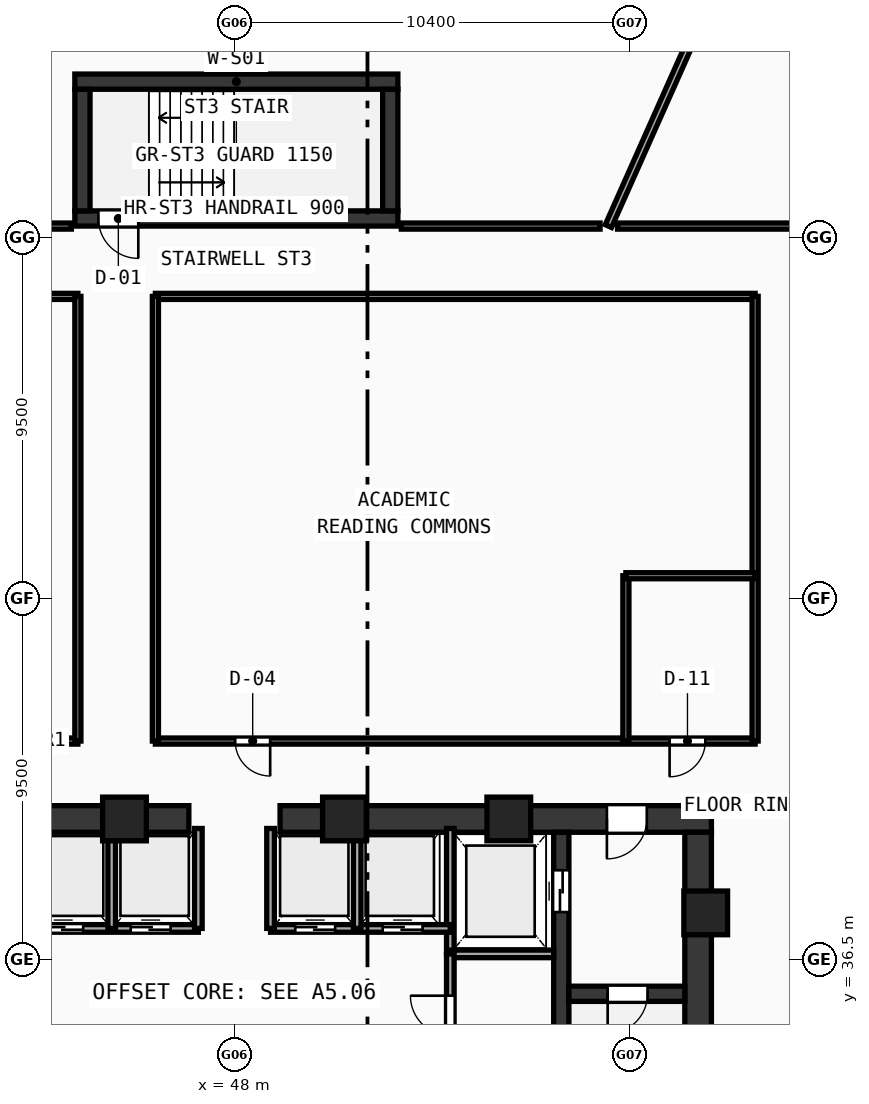
"""IFC4 building model, lengths in metres.
Left out: names, types, materials, properties, quantities, classifications, styles, units other than length and angle.
Written with IfcOpenShell. Run it as: python <this file> out.ifc"""

import sys

from ifc_helpers import new_model, si_unit, direction, frame, frame_2d, origin, origin_with_axes, origin_2d, place, context, subcontext, project, spatial, rectangle, hollow_rectangle, extrude, source, transform, mapped, element, fill, save


model = new_model("IFC4")
c1 = context("Model", 3, precision=1e-05, world=origin(), true_north=direction((0.0, 1.0)))
c2 = subcontext(c1, "Body", "Model", "MODEL_VIEW")
j1 = project(units=[si_unit("LENGTHUNIT", "METRE"), si_unit("PLANEANGLEUNIT", "RADIAN")], contexts=[c1])
p1 = place(None, origin())
s1 = spatial("IfcSite", under=j1, at=p1, CompositionType="ELEMENT")
p2 = place(p1, origin())
s2 = spatial("IfcBuilding", under=s1, at=p2, CompositionType="ELEMENT")
p3 = place(p2, frame((0.0, 0.0, 70.33)))
s3 = spatial("IfcBuildingStorey", under=s2, at=p3, CompositionType="ELEMENT", Elevation=70.33)
p4 = place(p3, frame((35.45, 40.2, 0.0), z_axis=(0.0, 0.0, 1.0), x_axis=(1.0, 0.0, 0.0)))
e1 = element("IfcWall", 1, at=p4, inside=s3, PredefinedType="SHEAR", context=c2, shape_type="SweptSolid", body=[
    extrude(rectangle(XDim=11.35, YDim=0.7, at=frame_2d((5.675, 0.0))), origin(), (0.0, 0.0, 1.0), 5.77),
])
p5 = place(p4, frame((1.7, 0.0, 0.0)))
e2 = element("IfcOpeningElement", 2, at=p5, cuts=e1, PredefinedType="OPENING", context=c2, shape_type="SweptSolid", body=[
    extrude(rectangle(XDim=1.05, YDim=2.1, at=frame_2d((0.525, 1.05))), frame((0.0, 0.36, 0.0), z_axis=(0.0, -1.0, 0.0), x_axis=(1.0, 0.0, 0.0)), (0.0, 0.0, 1.0), 0.72),
])
p6 = place(p3, frame((49.2, 40.2, 0.0), z_axis=(0.0, 0.0, 1.0), x_axis=(1.0, 0.0, 0.0)))
e3 = element("IfcWall", 3, at=p6, inside=s3, PredefinedType="SHEAR", context=c2, shape_type="SweptSolid", body=[
    extrude(rectangle(XDim=11.35, YDim=0.7, at=frame_2d((5.675, 0.0))), origin(), (0.0, 0.0, 1.0), 5.77),
])
p7 = place(p6, frame((8.6, 0.0, 0.0)))
e4 = element("IfcOpeningElement", 4, at=p7, cuts=e3, PredefinedType="OPENING", context=c2, shape_type="SweptSolid", body=[
    extrude(rectangle(XDim=1.05, YDim=2.1, at=frame_2d((0.525, 1.05))), frame((0.0, 0.36, 0.0), z_axis=(0.0, -1.0, 0.0), x_axis=(1.0, 0.0, 0.0)), (0.0, 0.0, 1.0), 0.72),
])
p8 = place(p3, frame((60.2, 27.85, 0.0), z_axis=(0.0, 0.0, 1.0), x_axis=(0.0, 1.0, 0.0)))
e5 = element("IfcWall", 5, at=p8, inside=s3, PredefinedType="SHEAR", context=c2, shape_type="SweptSolid", body=[
    extrude(rectangle(XDim=12.0, YDim=0.7, at=frame_2d((6.0, 0.0))), origin(), (0.0, 0.0, 1.0), 5.77),
])
p9 = place(p3, frame((56.6, 27.85, 0.0), z_axis=(0.0, 0.0, 1.0), x_axis=(0.0, 1.0, 0.0)))
e6 = element("IfcWall", 6, at=p9, inside=s3, PredefinedType="SHEAR", context=c2, shape_type="SweptSolid", body=[
    extrude(rectangle(XDim=12.0, YDim=0.4, at=frame_2d((6.0, 0.0))), origin(), (0.0, 0.0, 1.0), 5.77),
])
p10 = place(p9, frame((9.9, 0.0, 0.0)))
e7 = element("IfcOpeningElement", 7, at=p10, cuts=e6, PredefinedType="OPENING", context=c2, shape_type="SweptSolid", body=[
    extrude(rectangle(XDim=1.1, YDim=2.1, at=frame_2d((0.55, 1.05))), frame((0.0, 0.21, 0.0), z_axis=(0.0, -1.0, 0.0), x_axis=(1.0, 0.0, 0.0)), (0.0, 0.0, 1.0), 0.42),
])
p11 = place(p3, frame((56.8, 35.6, 0.0), z_axis=(0.0, 0.0, 1.0), x_axis=(1.0, 0.0, 0.0)))
e8 = element("IfcWall", 8, at=p11, inside=s3, PredefinedType="SHEAR", context=c2, shape_type="SweptSolid", body=[
    extrude(rectangle(XDim=3.05, YDim=0.4, at=frame_2d((1.525, 0.0))), origin(), (0.0, 0.0, 1.0), 5.77),
])
p12 = place(p11, frame((1.02, 0.0, 0.0)))
e9 = element("IfcOpeningElement", 9, at=p12, cuts=e8, PredefinedType="OPENING", context=c2, shape_type="SweptSolid", body=[
    extrude(rectangle(XDim=1.05, YDim=2.1, at=frame_2d((0.525, 1.05))), frame((0.0, 0.21, 0.0), z_axis=(0.0, -1.0, 0.0), x_axis=(1.0, 0.0, 0.0)), (0.0, 0.0, 1.0), 0.42),
])
p13 = place(p3, frame((43.8, 59.6, 0.0), z_axis=(0.0, 0.0, 1.0), x_axis=(1.0, 0.0, 0.0)))
e10 = element("IfcWall", 10, at=p13, inside=s3, PredefinedType="SHEAR", context=c2, shape_type="SweptSolid", body=[
    extrude(rectangle(XDim=8.5, YDim=0.4, at=frame_2d((4.25, 0.0))), origin(), (0.0, 0.0, 1.0), 5.77),
])
p14 = place(p3, frame((43.8, 56.0, 0.0), z_axis=(0.0, 0.0, 1.0), x_axis=(1.0, 0.0, 0.0)))
e11 = element("IfcWall", 11, at=p14, inside=s3, PredefinedType="SHEAR", context=c2, shape_type="SweptSolid", body=[
    extrude(rectangle(XDim=8.5, YDim=0.4, at=frame_2d((4.25, 0.0))), origin(), (0.0, 0.0, 1.0), 5.77),
])
p15 = place(p14, frame((0.62, 0.0, 0.0)))
e12 = element("IfcOpeningElement", 12, at=p15, cuts=e11, PredefinedType="OPENING", context=c2, shape_type="SweptSolid", body=[
    extrude(rectangle(XDim=1.05, YDim=2.1, at=frame_2d((0.525, 1.05))), frame((0.0, 0.21, 0.0), z_axis=(0.0, -1.0, 0.0), x_axis=(1.0, 0.0, 0.0)), (0.0, 0.0, 1.0), 0.42),
])
for number, where, z_axis, x_axis in (
    (13, (44.0, 56.2, 0.0), (0.0, 0.0, 1.0), (0.0, 1.0, 0.0)),
    (14, (52.1, 56.2, 0.0), (0.0, 0.0, 1.0), (0.0, 1.0, 0.0)),
):
    element("IfcWall", number, at=place(p3, frame(where, z_axis=z_axis, x_axis=x_axis)), inside=s3, PredefinedType="SHEAR", context=c2, shape_type="SweptSolid", body=[
        extrude(rectangle(XDim=3.2, YDim=0.4, at=frame_2d((1.6, 0.0))), origin(), (0.0, 0.0, 1.0), 5.77),
    ])
m1 = source(origin(), c2, "Body", "SweptSolid", [
    extrude(hollow_rectangle(XDim=1.15, YDim=1.15, WallThickness=0.048, at=origin_2d()), origin(), (0.0, 0.0, 1.0), 6.03),
])
for number, where, z_axis, x_axis in (
    (15, (60.4, 37.729, -0.26), (0.0, 0.0, 1.0), (1.0, 0.0, 0.0)),
    (16, (55.219, 40.2, -0.26), (0.0, 0.0, 1.0), (1.0, 0.0, 0.0)),
    (17, (50.894, 40.2, -0.26), (0.0, 0.0, 1.0), (1.0, 0.0, 0.0)),
    (18, (45.106, 40.2, -0.26), (0.0, 0.0, 1.0), (1.0, 0.0, 0.0)),
):
    element("IfcColumn", number, at=place(p3, frame(where, z_axis=z_axis, x_axis=x_axis)), inside=s3, PredefinedType="COLUMN", context=c2, shape_type="MappedRepresentation", body=[
        mapped(m1, transform((0.0, 0.0, 0.0), scale=1.0)),
    ])
p16 = place(p3, frame((53.68, 36.65, 0.0), z_axis=(0.0, 0.0, 1.0), x_axis=(0.0, 1.0, 0.0)))
e19 = element("IfcWall", 19, at=p16, inside=s3, PredefinedType="SOLIDWALL", context=c2, shape_type="SweptSolid", body=[
    extrude(rectangle(XDim=3.3, YDim=0.2, at=frame_2d((1.65, 0.0))), origin(), (0.0, 0.0, 1.0), 5.77),
])
p17 = place(p3, frame((53.68, 36.65, 0.0), z_axis=(0.0, 0.0, 1.0), x_axis=(1.0, 0.0, 0.0)))
e20 = element("IfcWall", 20, at=p17, inside=s3, PredefinedType="SOLIDWALL", context=c2, shape_type="SweptSolid", body=[
    extrude(rectangle(XDim=2.72, YDim=0.2, at=frame_2d((1.36, 0.0))), origin(), (0.0, 0.0, 1.0), 5.77),
])
p18 = place(p3, frame((42.32, 37.32, 0.0), z_axis=(0.0, 0.0, 1.0), x_axis=(1.0, 0.0, 0.0)))
e21 = element("IfcWall", 21, at=p18, inside=s3, PredefinedType="SOLIDWALL", context=c2, shape_type="SweptSolid", body=[
    extrude(rectangle(XDim=4.73, YDim=0.2, at=frame_2d((2.365, 0.0))), origin(), (0.0, 0.0, 1.0), 5.77),
])
p19 = place(p18, frame((0.65, 0.0, 0.0)))
e22 = element("IfcOpeningElement", 22, at=p19, cuts=e21, PredefinedType="OPENING", context=c2, shape_type="SweptSolid", body=[
    extrude(rectangle(XDim=1.05, YDim=2.1, at=frame_2d((0.525, 1.05))), frame((0.0, 0.11, 0.0), z_axis=(0.0, -1.0, 0.0), x_axis=(1.0, 0.0, 0.0)), (0.0, 0.0, 1.0), 0.22),
])
p20 = place(p18, frame((2.95, 0.0, 0.0)))
e23 = element("IfcOpeningElement", 23, at=p20, cuts=e21, PredefinedType="OPENING", context=c2, shape_type="SweptSolid", body=[
    extrude(rectangle(XDim=1.05, YDim=2.1, at=frame_2d((0.525, 1.05))), frame((0.0, 0.11, 0.0), z_axis=(0.0, -1.0, 0.0), x_axis=(1.0, 0.0, 0.0)), (0.0, 0.0, 1.0), 0.22),
])
p21 = place(p3, frame((48.95, 37.32, 0.0), z_axis=(0.0, 0.0, 1.0), x_axis=(1.0, 0.0, 0.0)))
e24 = element("IfcWall", 24, at=p21, inside=s3, PredefinedType="SOLIDWALL", context=c2, shape_type="SweptSolid", body=[
    extrude(rectangle(XDim=4.73, YDim=0.2, at=frame_2d((2.365, 0.0))), origin(), (0.0, 0.0, 1.0), 5.77),
])
p22 = place(p21, frame((0.65, 0.0, 0.0)))
e25 = element("IfcOpeningElement", 25, at=p22, cuts=e24, PredefinedType="OPENING", context=c2, shape_type="SweptSolid", body=[
    extrude(rectangle(XDim=1.05, YDim=2.1, at=frame_2d((0.525, 1.05))), frame((0.0, 0.11, 0.0), z_axis=(0.0, -1.0, 0.0), x_axis=(1.0, 0.0, 0.0)), (0.0, 0.0, 1.0), 0.22),
])
p23 = place(p21, frame((2.95, 0.0, 0.0)))
e26 = element("IfcOpeningElement", 26, at=p23, cuts=e24, PredefinedType="OPENING", context=c2, shape_type="SweptSolid", body=[
    extrude(rectangle(XDim=1.05, YDim=2.1, at=frame_2d((0.525, 1.05))), frame((0.0, 0.11, 0.0), z_axis=(0.0, -1.0, 0.0), x_axis=(1.0, 0.0, 0.0)), (0.0, 0.0, 1.0), 0.22),
])
for number, where, z_axis, x_axis in (
    (27, (47.05, 37.32, 0.0), (0.0, 0.0, 1.0), (0.0, 1.0, 0.0)),
    (28, (48.95, 37.32, 0.0), (0.0, 0.0, 1.0), (0.0, 1.0, 0.0)),
):
    element("IfcWall", number, at=place(p3, frame(where, z_axis=z_axis, x_axis=x_axis)), inside=s3, PredefinedType="SOLIDWALL", context=c2, shape_type="SweptSolid", body=[
        extrude(rectangle(XDim=2.63, YDim=0.2, at=frame_2d((1.315, 0.0))), origin(), (0.0, 0.0, 1.0), 5.77),
    ])
for number, where, z_axis, x_axis in (
    (29, (44.77, 37.32, 0.0), (0.0, 0.0, 1.0), (0.0, 1.0, 0.0)),
    (30, (51.23, 37.32, 0.0), (0.0, 0.0, 1.0), (0.0, 1.0, 0.0)),
):
    element("IfcWall", number, at=place(p3, frame(where, z_axis=z_axis, x_axis=x_axis)), inside=s3, PredefinedType="SOLIDWALL", context=c2, shape_type="SweptSolid", body=[
        extrude(rectangle(XDim=2.63, YDim=0.2, at=frame_2d((1.315, 0.0))), origin(), (0.0, 0.0, 1.0), 2.42),
    ])
p24 = place(p3, frame((53.68, 27.6, 0.0), z_axis=(0.0, 0.0, 1.0), x_axis=(0.0, 1.0, 0.0)))
e31 = element("IfcWall", 31, at=p24, inside=s3, PredefinedType="SOLIDWALL", context=c2, shape_type="SweptSolid", body=[
    extrude(rectangle(XDim=9.05, YDim=0.2, at=frame_2d((4.525, 0.0))), origin(), (0.0, 0.0, 1.0), 2.42),
])
p25 = place(p24, frame((6.9, 0.0, 0.0)))
e32 = element("IfcOpeningElement", 32, at=p25, cuts=e31, PredefinedType="OPENING", context=c2, shape_type="SweptSolid", body=[
    extrude(rectangle(XDim=1.05, YDim=2.1, at=frame_2d((0.525, 1.05))), frame((0.0, 0.11, 0.0), z_axis=(0.0, -1.0, 0.0), x_axis=(1.0, 0.0, 0.0)), (0.0, 0.0, 1.0), 0.22),
])
p26 = place(p3, frame((34.95, 42.25, 0.0), z_axis=(0.0, 0.0, 1.0), x_axis=(1.0, 0.0, 0.0)))
e33 = element("IfcWall", 33, at=p26, inside=s3, PredefinedType="PARTITIONING", context=c2, shape_type="SweptSolid", body=[
    extrude(rectangle(XDim=8.93, YDim=0.16, at=frame_2d((4.465, 0.0))), origin(), (0.0, 0.0, 1.0), 2.42),
])
p27 = place(p26, frame((1.15, 0.0, 0.0)))
e34 = element("IfcOpeningElement", 34, at=p27, cuts=e33, PredefinedType="OPENING", context=c2, shape_type="SweptSolid", body=[
    extrude(rectangle(XDim=0.92, YDim=2.1, at=frame_2d((0.46, 1.05))), frame((0.0, 0.09, 0.0), z_axis=(0.0, -1.0, 0.0), x_axis=(1.0, 0.0, 0.0)), (0.0, 0.0, 1.0), 0.18),
])
p28 = place(p26, frame((4.65, 0.0, 0.0)))
e35 = element("IfcOpeningElement", 35, at=p28, cuts=e33, PredefinedType="OPENING", context=c2, shape_type="SweptSolid", body=[
    extrude(rectangle(XDim=0.92, YDim=2.1, at=frame_2d((0.46, 1.05))), frame((0.0, 0.09, 0.0), z_axis=(0.0, -1.0, 0.0), x_axis=(1.0, 0.0, 0.0)), (0.0, 0.0, 1.0), 0.18),
])
p29 = place(p3, frame((34.95, 53.95, 0.0), z_axis=(0.0, 0.0, 1.0), x_axis=(1.0, 0.0, 0.0)))
e36 = element("IfcWall", 36, at=p29, inside=s3, PredefinedType="PARTITIONING", context=c2, shape_type="SweptSolid", body=[
    extrude(rectangle(XDim=8.93, YDim=0.16, at=frame_2d((4.465, 0.0))), origin(), (0.0, 0.0, 1.0), 2.42),
])
p30 = place(p3, frame((43.88, 42.25, 0.0), z_axis=(0.0, 0.0, 1.0), x_axis=(0.0, 1.0, 0.0)))
e37 = element("IfcWall", 37, at=p30, inside=s3, PredefinedType="PARTITIONING", context=c2, shape_type="SweptSolid", body=[
    extrude(rectangle(XDim=11.7, YDim=0.16, at=frame_2d((5.85, 0.0))), origin(), (0.0, 0.0, 1.0), 2.42),
])
p31 = place(p3, frame((45.92, 42.25, 0.0), z_axis=(0.0, 0.0, 1.0), x_axis=(1.0, 0.0, 0.0)))
e38 = element("IfcWall", 38, at=p31, inside=s3, PredefinedType="PARTITIONING", context=c2, shape_type="SweptSolid", body=[
    extrude(rectangle(XDim=15.78, YDim=0.16, at=frame_2d((7.89, 0.0))), origin(), (0.0, 0.0, 1.0), 2.42),
])
p32 = place(p31, frame((2.1, 0.0, 0.0)))
e39 = element("IfcOpeningElement", 39, at=p32, cuts=e38, PredefinedType="OPENING", context=c2, shape_type="SweptSolid", body=[
    extrude(rectangle(XDim=0.92, YDim=2.1, at=frame_2d((0.46, 1.05))), frame((0.0, 0.09, 0.0), z_axis=(0.0, -1.0, 0.0), x_axis=(1.0, 0.0, 0.0)), (0.0, 0.0, 1.0), 0.18),
])
p33 = place(p31, frame((13.53, 0.0, 0.0)))
e40 = element("IfcOpeningElement", 40, at=p33, cuts=e38, PredefinedType="OPENING", context=c2, shape_type="SweptSolid", body=[
    extrude(rectangle(XDim=0.94, YDim=2.1, at=frame_2d((0.47, 1.05))), frame((0.0, 0.09, 0.0), z_axis=(0.0, -1.0, 0.0), x_axis=(1.0, 0.0, 0.0)), (0.0, 0.0, 1.0), 0.18),
])
p34 = place(p3, frame((45.92, 53.95, 0.0), z_axis=(0.0, 0.0, 1.0), x_axis=(1.0, 0.0, 0.0)))
e41 = element("IfcWall", 41, at=p34, inside=s3, PredefinedType="PARTITIONING", context=c2, shape_type="SweptSolid", body=[
    extrude(rectangle(XDim=15.78, YDim=0.16, at=frame_2d((7.89, 0.0))), origin(), (0.0, 0.0, 1.0), 2.42),
])
p35 = place(p3, frame((45.92, 42.25, 0.0), z_axis=(0.0, 0.0, 1.0), x_axis=(0.0, 1.0, 0.0)))
e42 = element("IfcWall", 42, at=p35, inside=s3, PredefinedType="PARTITIONING", context=c2, shape_type="SweptSolid", body=[
    extrude(rectangle(XDim=11.7, YDim=0.16, at=frame_2d((5.85, 0.0))), origin(), (0.0, 0.0, 1.0), 5.37),
])
p36 = place(p3, frame((61.7, 42.25, 0.0), z_axis=(0.0, 0.0, 1.0), x_axis=(0.0, 1.0, 0.0)))
e43 = element("IfcWall", 43, at=p36, inside=s3, PredefinedType="PARTITIONING", context=c2, shape_type="SweptSolid", body=[
    extrude(rectangle(XDim=11.7, YDim=0.16, at=frame_2d((5.85, 0.0))), origin(), (0.0, 0.0, 1.0), 2.42),
])
p37 = place(p3, frame((58.3, 42.25, 0.0), z_axis=(0.0, 0.0, 1.0), x_axis=(0.0, 1.0, 0.0)))
e44 = element("IfcWall", 44, at=p37, inside=s3, PredefinedType="PARTITIONING", context=c2, shape_type="SweptSolid", body=[
    extrude(rectangle(XDim=4.35, YDim=0.16, at=frame_2d((2.175, 0.0))), origin(), (0.0, 0.0, 1.0), 2.42),
])
p38 = place(p3, frame((58.3, 46.6, 0.0), z_axis=(0.0, 0.0, 1.0), x_axis=(1.0, 0.0, 0.0)))
e45 = element("IfcWall", 45, at=p38, inside=s3, PredefinedType="PARTITIONING", context=c2, shape_type="SweptSolid", body=[
    extrude(rectangle(XDim=3.4, YDim=0.16, at=frame_2d((1.7, 0.0))), origin(), (0.0, 0.0, 1.0), 2.42),
])
p39 = place(p3, frame((57.84, 55.8, 0.0), z_axis=(0.0, 0.0, 1.0), x_axis=(0.406732277088, 0.913547401493, 0.0)))
e46 = element("IfcWall", 46, at=p39, inside=s3, PredefinedType="PARTITIONING", context=c2, shape_type="SweptSolid", body=[
    extrude(rectangle(XDim=17.698, YDim=0.18, at=frame_2d((8.849, 0.0))), origin(), (0.0, 0.0, 1.0), 2.42),
])
p40 = place(p3, frame((33.1, 55.8, 0.0), z_axis=(0.0, 0.0, 1.0), x_axis=(1.0, 0.0, 0.0)))
e47 = element("IfcWall", 47, at=p40, inside=s3, PredefinedType="PARTITIONING", context=c2, shape_type="SweptSolid", body=[
    extrude(rectangle(XDim=10.609, YDim=0.16, at=frame_2d((5.304, 0.0))), origin(), (0.0, 0.0, 1.0), 2.42),
])
p41 = place(p40, frame((4.635, 0.0, 0.0)))
e48 = element("IfcOpeningElement", 48, at=p41, cuts=e47, PredefinedType="OPENING", context=c2, shape_type="SweptSolid", body=[
    extrude(rectangle(XDim=0.95, YDim=2.1, at=frame_2d((0.475, 1.05))), frame((0.0, 0.09, 0.0), z_axis=(0.0, -1.0, 0.0), x_axis=(1.0, 0.0, 0.0)), (0.0, 0.0, 1.0), 0.18),
])
p42 = place(p3, frame((52.391, 55.8, 0.0), z_axis=(0.0, 0.0, 1.0), x_axis=(1.0, 0.0, 0.0)))
e49 = element("IfcWall", 49, at=p42, inside=s3, PredefinedType="PARTITIONING", context=c2, shape_type="SweptSolid", body=[
    extrude(rectangle(XDim=5.229, YDim=0.16, at=frame_2d((2.614, 0.0))), origin(), (0.0, 0.0, 1.0), 2.42),
])
p43 = place(p3, frame((58.08, 55.8, 0.0), z_axis=(0.0, 0.0, 1.0), x_axis=(1.0, 0.0, 0.0)))
e50 = element("IfcWall", 50, at=p43, inside=s3, PredefinedType="PARTITIONING", context=c2, shape_type="SweptSolid", body=[
    extrude(rectangle(XDim=5.47, YDim=0.16, at=frame_2d((2.735, 0.0))), origin(), (0.0, 0.0, 1.0), 2.42),
])
m2 = source(origin(), c2, "Body", "SweptSolid", [
    extrude(rectangle(XDim=1.05, YDim=2.1, at=frame_2d((0.525, 1.05))), frame((0.0, 0.025, 0.0), z_axis=(0.0, -1.0, 0.0), x_axis=(1.0, 0.0, 0.0)), (0.0, 0.0, 1.0), 0.05),
])
p44 = place(p12, frame((1.05, 0.0, 0.0), z_axis=(0.0, 0.0, 1.0), x_axis=(-1.0, 0.0, 0.0)))
e51 = element("IfcDoor", 51, at=p44, inside=s3, OperationType="SINGLE_SWING_RIGHT", PredefinedType="DOOR", context=c2, shape_type="MappedRepresentation", body=[
    mapped(m2, transform((0.0, 0.0, 0.0), scale=1.0)),
])
fill(e9, e51)
p45 = place(p7, frame((1.05, 0.0, 0.0), z_axis=(0.0, 0.0, 1.0), x_axis=(-1.0, 0.0, 0.0)))
e52 = element("IfcDoor", 52, at=p45, inside=s3, OperationType="SINGLE_SWING_RIGHT", PredefinedType="DOOR", context=c2, shape_type="MappedRepresentation", body=[
    mapped(m2, transform((0.0, 0.0, 0.0), scale=1.0)),
])
fill(e4, e52)
m3 = source(origin(), c2, "Body", "SweptSolid", [
    extrude(rectangle(XDim=1.1, YDim=2.1, at=frame_2d((0.55, 1.05))), frame((0.0, 0.025, 0.0), z_axis=(0.0, -1.0, 0.0), x_axis=(1.0, 0.0, 0.0)), (0.0, 0.0, 1.0), 0.05),
])
p46 = place(p10, origin_with_axes())
e53 = element("IfcDoor", 53, at=p46, inside=s3, OperationType="DOUBLE_DOOR_SLIDING", PredefinedType="DOOR", context=c2, shape_type="MappedRepresentation", body=[
    mapped(m3, transform((0.0, 0.0, 0.0), scale=1.0)),
])
fill(e7, e53)
p47 = place(p19, frame((1.05, 0.0, 0.0), z_axis=(0.0, 0.0, 1.0), x_axis=(-1.0, 0.0, 0.0)))
e54 = element("IfcDoor", 54, at=p47, inside=s3, OperationType="DOUBLE_DOOR_SLIDING", PredefinedType="DOOR", context=c2, shape_type="MappedRepresentation", body=[
    mapped(m2, transform((0.0, 0.0, 0.0), scale=1.0)),
])
fill(e22, e54)
p48 = place(p20, frame((1.05, 0.0, 0.0), z_axis=(0.0, 0.0, 1.0), x_axis=(-1.0, 0.0, 0.0)))
e55 = element("IfcDoor", 55, at=p48, inside=s3, OperationType="DOUBLE_DOOR_SLIDING", PredefinedType="DOOR", context=c2, shape_type="MappedRepresentation", body=[
    mapped(m2, transform((0.0, 0.0, 0.0), scale=1.0)),
])
fill(e23, e55)
p49 = place(p22, frame((1.05, 0.0, 0.0), z_axis=(0.0, 0.0, 1.0), x_axis=(-1.0, 0.0, 0.0)))
e56 = element("IfcDoor", 56, at=p49, inside=s3, OperationType="DOUBLE_DOOR_SLIDING", PredefinedType="DOOR", context=c2, shape_type="MappedRepresentation", body=[
    mapped(m2, transform((0.0, 0.0, 0.0), scale=1.0)),
])
fill(e25, e56)
p50 = place(p23, frame((1.05, 0.0, 0.0), z_axis=(0.0, 0.0, 1.0), x_axis=(-1.0, 0.0, 0.0)))
e57 = element("IfcDoor", 57, at=p50, inside=s3, OperationType="DOUBLE_DOOR_SLIDING", PredefinedType="DOOR", context=c2, shape_type="MappedRepresentation", body=[
    mapped(m2, transform((0.0, 0.0, 0.0), scale=1.0)),
])
fill(e26, e57)
p51 = place(p25, origin_with_axes())
e58 = element("IfcDoor", 58, at=p51, inside=s3, OperationType="SINGLE_SWING_RIGHT", PredefinedType="DOOR", context=c2, shape_type="MappedRepresentation", body=[
    mapped(m2, transform((0.0, 0.0, 0.0), scale=1.0)),
])
fill(e32, e58)
p52 = place(p15, frame((1.05, 0.0, 0.0), z_axis=(0.0, 0.0, 1.0), x_axis=(-1.0, 0.0, 0.0)))
e59 = element("IfcDoor", 59, at=p52, inside=s3, OperationType="SINGLE_SWING_LEFT", PredefinedType="DOOR", context=c2, shape_type="MappedRepresentation", body=[
    mapped(m2, transform((0.0, 0.0, 0.0), scale=1.0)),
])
fill(e12, e59)
m4 = source(origin(), c2, "Body", "SweptSolid", [
    extrude(rectangle(XDim=0.92, YDim=2.1, at=frame_2d((0.46, 1.05))), frame((0.0, 0.025, 0.0), z_axis=(0.0, -1.0, 0.0), x_axis=(1.0, 0.0, 0.0)), (0.0, 0.0, 1.0), 0.05),
])
p53 = place(p32, frame((0.92, 0.0, 0.0), z_axis=(0.0, 0.0, 1.0), x_axis=(-1.0, 0.0, 0.0)))
e60 = element("IfcDoor", 60, at=p53, inside=s3, OperationType="SINGLE_SWING_LEFT", PredefinedType="DOOR", context=c2, shape_type="MappedRepresentation", body=[
    mapped(m4, transform((0.0, 0.0, 0.0), scale=1.0)),
])
fill(e39, e60)
m5 = source(origin(), c2, "Body", "SweptSolid", [
    extrude(rectangle(XDim=0.94, YDim=2.1, at=frame_2d((0.47, 1.05))), frame((0.0, 0.025, 0.0), z_axis=(0.0, -1.0, 0.0), x_axis=(1.0, 0.0, 0.0)), (0.0, 0.0, 1.0), 0.05),
])
p54 = place(p33, frame((0.94, 0.0, 0.0), z_axis=(0.0, 0.0, 1.0), x_axis=(-1.0, 0.0, 0.0)))
e61 = element("IfcDoor", 61, at=p54, inside=s3, OperationType="SINGLE_SWING_RIGHT", PredefinedType="DOOR", context=c2, shape_type="MappedRepresentation", body=[
    mapped(m5, transform((0.0, 0.0, 0.0), scale=1.0)),
])
fill(e40, e61)
save(model, sys.argv[1])
